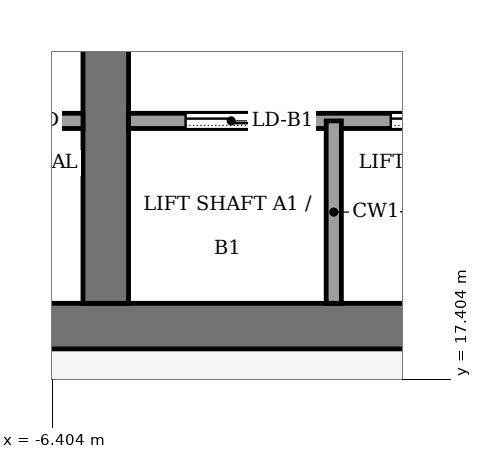
"""IFC4 building model, lengths in metres.
Left out: names, types, materials, properties, quantities, classifications, styles, units other than length and angle.
Written with IfcOpenShell. Run it as: python <this file> out.ifc"""

import sys

from ifc_helpers import new_model, si_unit, direction, frame, frame_2d, origin, place, context, subcontext, project, spatial, rectangle, extrude, element, fill, save


model = new_model("IFC4")
c1 = context("Model", 3, precision=1e-05, world=origin(), true_north=direction((0.0, 1.0)))
c2 = subcontext(c1, "Body", "Model", "MODEL_VIEW")
j1 = project(units=[si_unit("LENGTHUNIT", "METRE"), si_unit("PLANEANGLEUNIT", "RADIAN")], contexts=[c1])
p1 = place(None, origin())
s1 = spatial("IfcSite", under=j1, at=p1, CompositionType="ELEMENT")
p2 = place(p1, origin())
s2 = spatial("IfcBuilding", under=s1, at=p2, CompositionType="ELEMENT")
p3 = place(p2, frame((0.0, 0.0, 334.0)))
s3 = spatial("IfcBuildingStorey", under=s2, at=p3, CompositionType="ELEMENT", Elevation=334.0)
p4 = place(p3, frame((-13.2, 18.1, -0.18), z_axis=(0.0, 0.0, 1.0), x_axis=(1.0, 0.0, 0.0)))
e1 = element("IfcWall", 1, at=p4, inside=s3, PredefinedType="SHEAR", context=c2, shape_type="SweptSolid", body=[
    extrude(rectangle(XDim=26.4, YDim=0.6, at=frame_2d((13.2, 0.0))), origin(), (0.0, 0.0, 1.0), 6.53),
])
p5 = place(p3, frame((-5.7, 18.4, -0.18), z_axis=(0.0, 0.0, 1.0), x_axis=(0.0, 1.0, 0.0)))
e2 = element("IfcWall", 2, at=p5, inside=s3, PredefinedType="SHEAR", context=c2, shape_type="SweptSolid", body=[
    extrude(rectangle(XDim=19.2, YDim=0.6, at=frame_2d((9.6, 0.0))), origin(), (0.0, 0.0, 1.0), 6.53),
])
p6 = place(p5, frame((8.35, 0.0, 0.18)))
e3 = element("IfcOpeningElement", 3, at=p6, cuts=e2, PredefinedType="OPENING", context=c2, shape_type="SweptSolid", body=[
    extrude(rectangle(XDim=0.9, YDim=2.1, at=frame_2d((0.45, 1.05))), frame((0.0, 0.31, 0.0), z_axis=(0.0, -1.0, 0.0), x_axis=(1.0, 0.0, 0.0)), (0.0, 0.0, 1.0), 0.62),
])
p7 = place(p3, frame((-12.6, 20.8, 0.0), z_axis=(0.0, 0.0, 1.0), x_axis=(1.0, 0.0, 0.0)))
e4 = element("IfcWall", 4, at=p7, inside=s3, PredefinedType="PARTITIONING", context=c2, shape_type="SweptSolid", body=[
    extrude(rectangle(XDim=6.6, YDim=0.2, at=frame_2d((3.3, 0.0))), origin(), (0.0, 0.0, 1.0), 6.35),
])
p8 = place(p7, frame((1.81, 0.0, 0.0)))
e5 = element("IfcOpeningElement", 5, at=p8, cuts=e4, PredefinedType="OPENING", context=c2, shape_type="SweptSolid", body=[
    extrude(rectangle(XDim=1.0, YDim=2.1, at=frame_2d((0.5, 1.05))), frame((0.0, 0.11, 0.0), z_axis=(0.0, -1.0, 0.0), x_axis=(1.0, 0.0, 0.0)), (0.0, 0.0, 1.0), 0.22),
])
p9 = place(p7, frame((5.11, 0.0, 0.0)))
e6 = element("IfcOpeningElement", 6, at=p9, cuts=e4, PredefinedType="OPENING", context=c2, shape_type="SweptSolid", body=[
    extrude(rectangle(XDim=1.0, YDim=2.1, at=frame_2d((0.5, 1.05))), frame((0.0, 0.11, 0.0), z_axis=(0.0, -1.0, 0.0), x_axis=(1.0, 0.0, 0.0)), (0.0, 0.0, 1.0), 0.22),
])
p10 = place(p3, frame((-5.4, 20.8, 0.0), z_axis=(0.0, 0.0, 1.0), x_axis=(1.0, 0.0, 0.0)))
e7 = element("IfcWall", 7, at=p10, inside=s3, PredefinedType="PARTITIONING", context=c2, shape_type="SweptSolid", body=[
    extrude(rectangle(XDim=10.8, YDim=0.2, at=frame_2d((5.4, 0.0))), origin(), (0.0, 0.0, 1.0), 6.35),
])
p11 = place(p10, frame((0.75, 0.0, 0.0)))
e8 = element("IfcOpeningElement", 8, at=p11, cuts=e7, PredefinedType="OPENING", context=c2, shape_type="SweptSolid", body=[
    extrude(rectangle(XDim=1.2, YDim=2.2, at=frame_2d((0.6, 1.1))), frame((0.0, 0.11, 0.0), z_axis=(0.0, -1.0, 0.0), x_axis=(1.0, 0.0, 0.0)), (0.0, 0.0, 1.0), 0.22),
])
p12 = place(p10, frame((3.45, 0.0, 0.0)))
e9 = element("IfcOpeningElement", 9, at=p12, cuts=e7, PredefinedType="OPENING", context=c2, shape_type="SweptSolid", body=[
    extrude(rectangle(XDim=1.2, YDim=2.2, at=frame_2d((0.6, 1.1))), frame((0.0, 0.11, 0.0), z_axis=(0.0, -1.0, 0.0), x_axis=(1.0, 0.0, 0.0)), (0.0, 0.0, 1.0), 0.22),
])
p13 = place(p10, frame((6.15, 0.0, 0.0)))
e10 = element("IfcOpeningElement", 10, at=p13, cuts=e7, PredefinedType="OPENING", context=c2, shape_type="SweptSolid", body=[
    extrude(rectangle(XDim=1.2, YDim=2.2, at=frame_2d((0.6, 1.1))), frame((0.0, 0.11, 0.0), z_axis=(0.0, -1.0, 0.0), x_axis=(1.0, 0.0, 0.0)), (0.0, 0.0, 1.0), 0.22),
])
p14 = place(p10, frame((8.85, 0.0, 0.0)))
e11 = element("IfcOpeningElement", 11, at=p14, cuts=e7, PredefinedType="OPENING", context=c2, shape_type="SweptSolid", body=[
    extrude(rectangle(XDim=1.2, YDim=2.2, at=frame_2d((0.6, 1.1))), frame((0.0, 0.11, 0.0), z_axis=(0.0, -1.0, 0.0), x_axis=(1.0, 0.0, 0.0)), (0.0, 0.0, 1.0), 0.22),
])
p15 = place(p3, frame((-2.7, 18.4, 0.0), z_axis=(0.0, 0.0, 1.0), x_axis=(0.0, 1.0, 0.0)))
e12 = element("IfcWall", 12, at=p15, inside=s3, PredefinedType="PARTITIONING", context=c2, shape_type="SweptSolid", body=[
    extrude(rectangle(XDim=2.4, YDim=0.2, at=frame_2d((1.2, 0.0))), origin(), (0.0, 0.0, 1.0), 6.35),
])
p16 = place(p11, origin())
e13 = element("IfcDoor", 13, at=p16, inside=s3, OperationType="SLIDING_TO_LEFT", PredefinedType="DOOR", context=c2, shape_type="SweptSolid", body=[
    extrude(rectangle(XDim=1.2, YDim=2.2, at=frame_2d((0.6, 1.1))), frame((0.0, 0.025, 0.0), z_axis=(0.0, -1.0, 0.0), x_axis=(1.0, 0.0, 0.0)), (0.0, 0.0, 1.0), 0.05),
])
fill(e8, e13)
p17 = place(p12, origin())
e14 = element("IfcDoor", 14, at=p17, inside=s3, OperationType="SLIDING_TO_LEFT", PredefinedType="DOOR", context=c2, shape_type="SweptSolid", body=[
    extrude(rectangle(XDim=1.2, YDim=2.2, at=frame_2d((0.6, 1.1))), frame((0.0, 0.025, 0.0), z_axis=(0.0, -1.0, 0.0), x_axis=(1.0, 0.0, 0.0)), (0.0, 0.0, 1.0), 0.05),
])
fill(e9, e14)
save(model, sys.argv[1])
